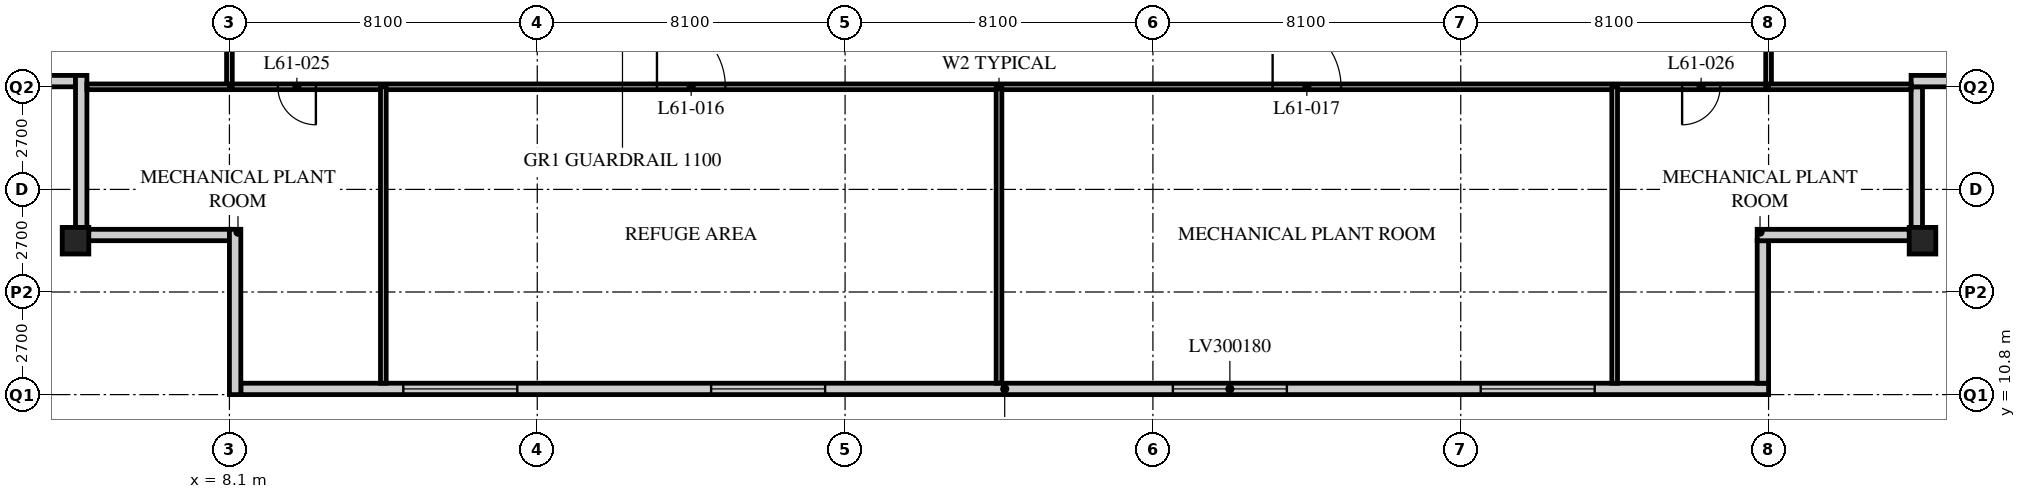
"""IFC4 building model, lengths in metres.
Left out: names, types, materials, properties, quantities, classifications, styles, units other than length and angle.
Written with IfcOpenShell. Run it as: python <this file> out.ifc"""

import sys

from ifc_helpers import new_model, si_unit, direction, frame, frame_2d, origin, origin_2d, place, context, subcontext, project, spatial, rectangle, hollow_rectangle, extrude, element, fill, save


model = new_model("IFC4")
c1 = context("Model", 3, precision=1e-05, world=origin(), true_north=direction((0.0, 1.0)))
c2 = subcontext(c1, "Body", "Model", "MODEL_VIEW")
j1 = project(units=[si_unit("LENGTHUNIT", "METRE"), si_unit("PLANEANGLEUNIT", "RADIAN")], contexts=[c1])
p1 = place(None, origin())
s1 = spatial("IfcSite", under=j1, at=p1, CompositionType="ELEMENT")
p2 = place(p1, origin())
s2 = spatial("IfcBuilding", under=s1, at=p2, CompositionType="ELEMENT")
p3 = place(p2, frame((0.0, 0.0, 235.2)))
s3 = spatial("IfcBuildingStorey", under=s2, at=p3, CompositionType="ELEMENT", Elevation=235.2)
for number, where, z_axis, x_axis in (
    (1, (4.05, 14.85, 0.0), (0.0, 0.0, 1.0), (1.0, 0.0, 0.0)),
    (2, (52.65, 14.85, 0.0), (0.0, 0.0, 1.0), (1.0, 0.0, 0.0)),
):
    element("IfcColumn", number, at=place(p3, frame(where, z_axis=z_axis, x_axis=x_axis)), inside=s3, PredefinedType="COLUMN", context=c2, shape_type="SweptSolid", body=[
        extrude(hollow_rectangle(XDim=0.7, YDim=0.7, WallThickness=0.07, at=origin_2d()), origin(), (0.0, 0.0, 1.0), 7.2),
    ])
p4 = place(p3, frame((8.4, 10.95, 0.0), z_axis=(0.0, 0.0, 1.0), x_axis=(1.0, 0.0, 0.0)))
e3 = element("IfcWall", 3, at=p4, inside=s3, PredefinedType="SOLIDWALL", context=c2, shape_type="SweptSolid", body=[
    extrude(rectangle(XDim=40.2, YDim=0.3, at=frame_2d((20.1, 0.0))), origin(), (0.0, 0.0, 1.0), 5.95),
])
p5 = place(p4, frame((4.275, 0.0, 1.0)))
e4 = element("IfcOpeningElement", 4, at=p5, cuts=e3, PredefinedType="OPENING", context=c2, shape_type="SweptSolid", body=[
    extrude(rectangle(XDim=3.0, YDim=1.8, at=frame_2d((1.5, 0.9))), frame((0.0, 0.16, 0.0), z_axis=(0.0, -1.0, 0.0), x_axis=(1.0, 0.0, 0.0)), (0.0, 0.0, 1.0), 0.32),
])
p6 = place(p4, frame((12.375, 0.0, 1.0)))
e5 = element("IfcOpeningElement", 5, at=p6, cuts=e3, PredefinedType="OPENING", context=c2, shape_type="SweptSolid", body=[
    extrude(rectangle(XDim=3.0, YDim=1.8, at=frame_2d((1.5, 0.9))), frame((0.0, 0.16, 0.0), z_axis=(0.0, -1.0, 0.0), x_axis=(1.0, 0.0, 0.0)), (0.0, 0.0, 1.0), 0.32),
])
p7 = place(p4, frame((24.525, 0.0, 1.0)))
e6 = element("IfcOpeningElement", 6, at=p7, cuts=e3, PredefinedType="OPENING", context=c2, shape_type="SweptSolid", body=[
    extrude(rectangle(XDim=3.0, YDim=1.8, at=frame_2d((1.5, 0.9))), frame((0.0, 0.16, 0.0), z_axis=(0.0, -1.0, 0.0), x_axis=(1.0, 0.0, 0.0)), (0.0, 0.0, 1.0), 0.32),
])
p8 = place(p4, frame((32.625, 0.0, 1.0)))
e7 = element("IfcOpeningElement", 7, at=p8, cuts=e3, PredefinedType="OPENING", context=c2, shape_type="SweptSolid", body=[
    extrude(rectangle(XDim=3.0, YDim=1.8, at=frame_2d((1.5, 0.9))), frame((0.0, 0.16, 0.0), z_axis=(0.0, -1.0, 0.0), x_axis=(1.0, 0.0, 0.0)), (0.0, 0.0, 1.0), 0.32),
])
p9 = place(p3, frame((48.45, 11.1, 0.0), z_axis=(0.0, 0.0, 1.0), x_axis=(0.0, 1.0, 0.0)))
e8 = element("IfcWall", 8, at=p9, inside=s3, PredefinedType="SOLIDWALL", context=c2, shape_type="SweptSolid", body=[
    extrude(rectangle(XDim=3.75, YDim=0.3, at=frame_2d((1.875, 0.0))), origin(), (0.0, 0.0, 1.0), 5.95),
])
p10 = place(p3, frame((48.3, 15.0, 0.0), z_axis=(0.0, 0.0, 1.0), x_axis=(1.0, 0.0, 0.0)))
e9 = element("IfcWall", 9, at=p10, inside=s3, PredefinedType="SOLIDWALL", context=c2, shape_type="SweptSolid", body=[
    extrude(rectangle(XDim=4.35, YDim=0.3, at=frame_2d((2.175, 0.0))), origin(), (0.0, 0.0, 1.0), 6.25),
])
p11 = place(p3, frame((52.5, 15.15, 0.0), z_axis=(0.0, 0.0, 1.0), x_axis=(0.0, 1.0, 0.0)))
e10 = element("IfcWall", 10, at=p11, inside=s3, PredefinedType="SOLIDWALL", context=c2, shape_type="SweptSolid", body=[
    extrude(rectangle(XDim=3.75, YDim=0.3, at=frame_2d((1.875, 0.0))), origin(), (0.0, 0.0, 1.0), 6.25),
])
p12 = place(p3, frame((52.35, 19.05, 0.0), z_axis=(0.0, 0.0, 1.0), x_axis=(1.0, 0.0, 0.0)))
e11 = element("IfcWall", 11, at=p12, inside=s3, PredefinedType="SOLIDWALL", context=c2, shape_type="SweptSolid", body=[
    extrude(rectangle(XDim=4.35, YDim=0.3, at=frame_2d((2.175, 0.0))), origin(), (0.0, 0.0, 1.0), 5.95),
])
p13 = place(p3, frame((0.3, 19.05, 0.0), z_axis=(0.0, 0.0, 1.0), x_axis=(1.0, 0.0, 0.0)))
e12 = element("IfcWall", 12, at=p13, inside=s3, PredefinedType="SOLIDWALL", context=c2, shape_type="SweptSolid", body=[
    extrude(rectangle(XDim=3.75, YDim=0.3, at=frame_2d((1.875, 0.0))), origin(), (0.0, 0.0, 1.0), 5.95),
])
p14 = place(p3, frame((4.2, 19.2, 0.0), z_axis=(0.0, 0.0, 1.0), x_axis=(0.0, -1.0, 0.0)))
e13 = element("IfcWall", 13, at=p14, inside=s3, PredefinedType="SOLIDWALL", context=c2, shape_type="SweptSolid", body=[
    extrude(rectangle(XDim=4.35, YDim=0.3, at=frame_2d((2.175, 0.0))), origin(), (0.0, 0.0, 1.0), 6.25),
])
p15 = place(p3, frame((4.35, 15.0, 0.0), z_axis=(0.0, 0.0, 1.0), x_axis=(1.0, 0.0, 0.0)))
e14 = element("IfcWall", 14, at=p15, inside=s3, PredefinedType="SOLIDWALL", context=c2, shape_type="SweptSolid", body=[
    extrude(rectangle(XDim=3.75, YDim=0.3, at=frame_2d((1.875, 0.0))), origin(), (0.0, 0.0, 1.0), 6.25),
])
p16 = place(p3, frame((8.25, 15.15, 0.0), z_axis=(0.0, 0.0, 1.0), x_axis=(0.0, -1.0, 0.0)))
e15 = element("IfcWall", 15, at=p16, inside=s3, PredefinedType="SOLIDWALL", context=c2, shape_type="SweptSolid", body=[
    extrude(rectangle(XDim=4.35, YDim=0.3, at=frame_2d((2.175, 0.0))), origin(), (0.0, 0.0, 1.0), 5.95),
])
p17 = place(p3, frame((8.1, 18.9, 0.0), z_axis=(0.0, 0.0, 1.0), x_axis=(1.0, 0.0, 0.0)))
e16 = element("IfcWall", 16, at=p17, inside=s3, PredefinedType="PARTITIONING", context=c2, shape_type="SweptSolid", body=[
    extrude(rectangle(XDim=40.5, YDim=0.15, at=frame_2d((20.25, 0.0))), origin(), (0.0, 0.0, 1.0), 5.95),
])
p18 = place(p17, frame((11.25, 0.0, 0.0)))
e17 = element("IfcOpeningElement", 17, at=p18, cuts=e16, PredefinedType="OPENING", context=c2, shape_type="SweptSolid", body=[
    extrude(rectangle(XDim=1.8, YDim=2.4, at=frame_2d((0.9, 1.2))), frame((0.0, 0.085, 0.0), z_axis=(0.0, -1.0, 0.0), x_axis=(1.0, 0.0, 0.0)), (0.0, 0.0, 1.0), 0.17),
])
p19 = place(p17, frame((27.45, 0.0, 0.0)))
e18 = element("IfcOpeningElement", 18, at=p19, cuts=e16, PredefinedType="OPENING", context=c2, shape_type="SweptSolid", body=[
    extrude(rectangle(XDim=1.8, YDim=2.4, at=frame_2d((0.9, 1.2))), frame((0.0, 0.085, 0.0), z_axis=(0.0, -1.0, 0.0), x_axis=(1.0, 0.0, 0.0)), (0.0, 0.0, 1.0), 0.17),
])
p20 = place(p17, frame((1.275, 0.0, 0.0)))
e19 = element("IfcOpeningElement", 19, at=p20, cuts=e16, PredefinedType="OPENING", context=c2, shape_type="SweptSolid", body=[
    extrude(rectangle(XDim=1.0, YDim=2.1, at=frame_2d((0.5, 1.05))), frame((0.0, 0.085, 0.0), z_axis=(0.0, -1.0, 0.0), x_axis=(1.0, 0.0, 0.0)), (0.0, 0.0, 1.0), 0.17),
])
p21 = place(p17, frame((38.225, 0.0, 0.0)))
e20 = element("IfcOpeningElement", 20, at=p21, cuts=e16, PredefinedType="OPENING", context=c2, shape_type="SweptSolid", body=[
    extrude(rectangle(XDim=1.0, YDim=2.1, at=frame_2d((0.5, 1.05))), frame((0.0, 0.085, 0.0), z_axis=(0.0, -1.0, 0.0), x_axis=(1.0, 0.0, 0.0)), (0.0, 0.0, 1.0), 0.17),
])
p22 = place(p3, frame((8.1, 18.9, 0.0), z_axis=(0.0, 0.0, 1.0), x_axis=(0.0, 1.0, 0.0)))
e21 = element("IfcWall", 21, at=p22, inside=s3, PredefinedType="PARTITIONING", context=c2, shape_type="SweptSolid", body=[
    extrude(rectangle(XDim=32.4, YDim=0.15, at=frame_2d((16.2, 0.0))), origin(), (0.0, 0.0, 1.0), 5.95),
])
p23 = place(p22, frame((10.95, 0.0, 0.0)))
e22 = element("IfcOpeningElement", 22, at=p23, cuts=e21, PredefinedType="OPENING", context=c2, shape_type="SweptSolid", body=[
    extrude(rectangle(XDim=1.8, YDim=2.4, at=frame_2d((0.9, 1.2))), frame((0.0, 0.085, 0.0), z_axis=(0.0, -1.0, 0.0), x_axis=(1.0, 0.0, 0.0)), (0.0, 0.0, 1.0), 0.17),
])
p24 = place(p22, frame((27.15, 0.0, 0.0)))
e23 = element("IfcOpeningElement", 23, at=p24, cuts=e21, PredefinedType="OPENING", context=c2, shape_type="SweptSolid", body=[
    extrude(rectangle(XDim=1.8, YDim=2.4, at=frame_2d((0.9, 1.2))), frame((0.0, 0.085, 0.0), z_axis=(0.0, -1.0, 0.0), x_axis=(1.0, 0.0, 0.0)), (0.0, 0.0, 1.0), 0.17),
])
p25 = place(p3, frame((48.6, 18.9, 0.0), z_axis=(0.0, 0.0, 1.0), x_axis=(0.0, 1.0, 0.0)))
e24 = element("IfcWall", 24, at=p25, inside=s3, PredefinedType="PARTITIONING", context=c2, shape_type="SweptSolid", body=[
    extrude(rectangle(XDim=32.4, YDim=0.15, at=frame_2d((16.2, 0.0))), origin(), (0.0, 0.0, 1.0), 5.95),
])
p26 = place(p25, frame((10.95, 0.0, 0.0)))
e25 = element("IfcOpeningElement", 25, at=p26, cuts=e24, PredefinedType="OPENING", context=c2, shape_type="SweptSolid", body=[
    extrude(rectangle(XDim=1.8, YDim=2.4, at=frame_2d((0.9, 1.2))), frame((0.0, 0.085, 0.0), z_axis=(0.0, -1.0, 0.0), x_axis=(1.0, 0.0, 0.0)), (0.0, 0.0, 1.0), 0.17),
])
p27 = place(p25, frame((27.15, 0.0, 0.0)))
e26 = element("IfcOpeningElement", 26, at=p27, cuts=e24, PredefinedType="OPENING", context=c2, shape_type="SweptSolid", body=[
    extrude(rectangle(XDim=1.8, YDim=2.4, at=frame_2d((0.9, 1.2))), frame((0.0, 0.085, 0.0), z_axis=(0.0, -1.0, 0.0), x_axis=(1.0, 0.0, 0.0)), (0.0, 0.0, 1.0), 0.17),
])
p28 = place(p3, frame((28.35, 18.9, 0.0), z_axis=(0.0, 0.0, 1.0), x_axis=(0.0, -1.0, 0.0)))
e27 = element("IfcWall", 27, at=p28, inside=s3, PredefinedType="PARTITIONING", context=c2, shape_type="SweptSolid", body=[
    extrude(rectangle(XDim=7.8, YDim=0.15, at=frame_2d((3.9, 0.0))), origin(), (0.0, 0.0, 1.0), 6.95),
])
p29 = place(p3, frame((4.35, 18.9, 0.0), z_axis=(0.0, 0.0, 1.0), x_axis=(1.0, 0.0, 0.0)))
e28 = element("IfcWall", 28, at=p29, inside=s3, PredefinedType="PARTITIONING", context=c2, shape_type="SweptSolid", body=[
    extrude(rectangle(XDim=3.75, YDim=0.15, at=frame_2d((1.875, 0.0))), origin(), (0.0, 0.0, 1.0), 5.95),
])
p30 = place(p3, frame((12.15, 18.9, 0.0), z_axis=(0.0, 0.0, 1.0), x_axis=(0.0, -1.0, 0.0)))
e29 = element("IfcWall", 29, at=p30, inside=s3, PredefinedType="PARTITIONING", context=c2, shape_type="SweptSolid", body=[
    extrude(rectangle(XDim=7.8, YDim=0.15, at=frame_2d((3.9, 0.0))), origin(), (0.0, 0.0, 1.0), 6.95),
])
p31 = place(p3, frame((48.6, 18.9, 0.0), z_axis=(0.0, 0.0, 1.0), x_axis=(1.0, 0.0, 0.0)))
e30 = element("IfcWall", 30, at=p31, inside=s3, PredefinedType="PARTITIONING", context=c2, shape_type="SweptSolid", body=[
    extrude(rectangle(XDim=3.75, YDim=0.15, at=frame_2d((1.875, 0.0))), origin(), (0.0, 0.0, 1.0), 5.95),
])
p32 = place(p3, frame((44.55, 18.9, 0.0), z_axis=(0.0, 0.0, 1.0), x_axis=(0.0, -1.0, 0.0)))
e31 = element("IfcWall", 31, at=p32, inside=s3, PredefinedType="PARTITIONING", context=c2, shape_type="SweptSolid", body=[
    extrude(rectangle(XDim=7.8, YDim=0.15, at=frame_2d((3.9, 0.0))), origin(), (0.0, 0.0, 1.0), 6.95),
])
p33 = place(p5, origin())
e32 = element("IfcWindow", 32, at=p33, inside=s3, PartitioningType="SINGLE_PANEL", PredefinedType="USERDEFINED", context=c2, shape_type="SweptSolid", body=[
    extrude(rectangle(XDim=3.0, YDim=1.8, at=frame_2d((1.5, 0.9))), frame((0.0, 0.075, 0.0), z_axis=(0.0, -1.0, 0.0), x_axis=(1.0, 0.0, 0.0)), (0.0, 0.0, 1.0), 0.15),
])
fill(e4, e32)
p34 = place(p6, origin())
e33 = element("IfcWindow", 33, at=p34, inside=s3, PartitioningType="SINGLE_PANEL", PredefinedType="USERDEFINED", context=c2, shape_type="SweptSolid", body=[
    extrude(rectangle(XDim=3.0, YDim=1.8, at=frame_2d((1.5, 0.9))), frame((0.0, 0.075, 0.0), z_axis=(0.0, -1.0, 0.0), x_axis=(1.0, 0.0, 0.0)), (0.0, 0.0, 1.0), 0.15),
])
fill(e5, e33)
p35 = place(p7, origin())
e34 = element("IfcWindow", 34, at=p35, inside=s3, PartitioningType="SINGLE_PANEL", PredefinedType="USERDEFINED", context=c2, shape_type="SweptSolid", body=[
    extrude(rectangle(XDim=3.0, YDim=1.8, at=frame_2d((1.5, 0.9))), frame((0.0, 0.075, 0.0), z_axis=(0.0, -1.0, 0.0), x_axis=(1.0, 0.0, 0.0)), (0.0, 0.0, 1.0), 0.15),
])
fill(e6, e34)
p36 = place(p8, origin())
e35 = element("IfcWindow", 35, at=p36, inside=s3, PartitioningType="SINGLE_PANEL", PredefinedType="USERDEFINED", context=c2, shape_type="SweptSolid", body=[
    extrude(rectangle(XDim=3.0, YDim=1.8, at=frame_2d((1.5, 0.9))), frame((0.0, 0.075, 0.0), z_axis=(0.0, -1.0, 0.0), x_axis=(1.0, 0.0, 0.0)), (0.0, 0.0, 1.0), 0.15),
])
fill(e7, e35)
p37 = place(p18, origin())
e36 = element("IfcDoor", 36, at=p37, inside=s3, OperationType="DOUBLE_DOOR_SINGLE_SWING", PredefinedType="DOOR", context=c2, shape_type="SweptSolid", body=[
    extrude(rectangle(XDim=1.8, YDim=2.4, at=frame_2d((0.9, 1.2))), frame((0.0, 0.025, 0.0), z_axis=(0.0, -1.0, 0.0), x_axis=(1.0, 0.0, 0.0)), (0.0, 0.0, 1.0), 0.05),
])
fill(e17, e36)
p38 = place(p19, origin())
e37 = element("IfcDoor", 37, at=p38, inside=s3, OperationType="DOUBLE_DOOR_SINGLE_SWING", PredefinedType="DOOR", context=c2, shape_type="SweptSolid", body=[
    extrude(rectangle(XDim=1.8, YDim=2.4, at=frame_2d((0.9, 1.2))), frame((0.0, 0.025, 0.0), z_axis=(0.0, -1.0, 0.0), x_axis=(1.0, 0.0, 0.0)), (0.0, 0.0, 1.0), 0.05),
])
fill(e18, e37)
p39 = place(p20, origin())
e38 = element("IfcDoor", 38, at=p39, inside=s3, OperationType="SINGLE_SWING_LEFT", PredefinedType="DOOR", context=c2, shape_type="SweptSolid", body=[
    extrude(rectangle(XDim=1.0, YDim=2.1, at=frame_2d((0.5, 1.05))), frame((0.0, 0.025, 0.0), z_axis=(0.0, -1.0, 0.0), x_axis=(1.0, 0.0, 0.0)), (0.0, 0.0, 1.0), 0.05),
])
fill(e19, e38)
p40 = place(p21, origin())
e39 = element("IfcDoor", 39, at=p40, inside=s3, OperationType="SINGLE_SWING_RIGHT", PredefinedType="DOOR", context=c2, shape_type="SweptSolid", body=[
    extrude(rectangle(XDim=1.0, YDim=2.1, at=frame_2d((0.5, 1.05))), frame((0.0, 0.025, 0.0), z_axis=(0.0, -1.0, 0.0), x_axis=(1.0, 0.0, 0.0)), (0.0, 0.0, 1.0), 0.05),
])
fill(e20, e39)
save(model, sys.argv[1])
